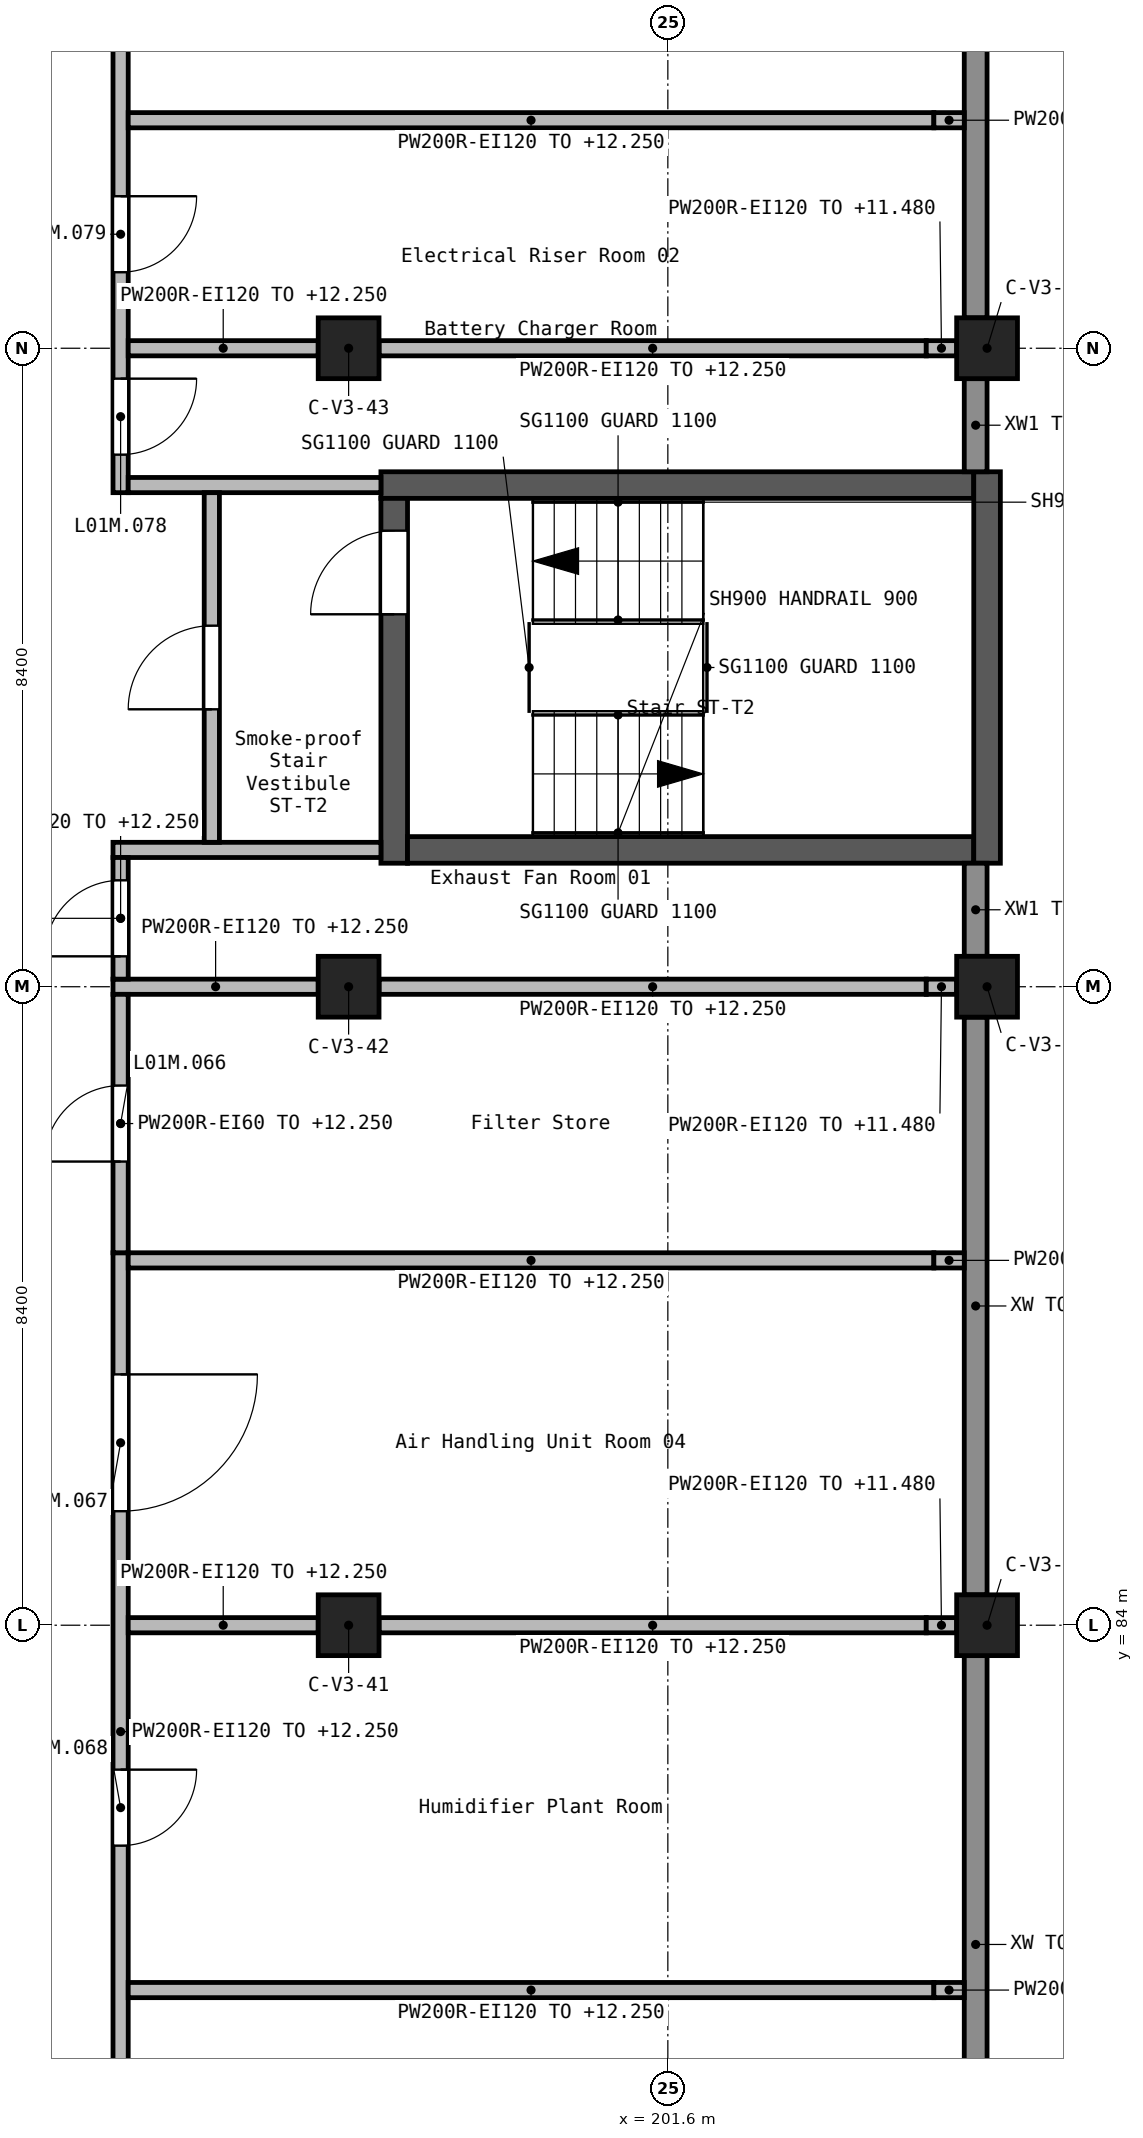
"""IFC4 building model, lengths in metres.
Left out: names, types, materials, properties, quantities, classifications, styles, units other than length and angle.
Written with IfcOpenShell. Run it as: python <this file> out.ifc"""

import sys

from ifc_helpers import new_model, si_unit, direction, frame, frame_2d, origin, origin_2d, place, context, subcontext, project, spatial, rectangle, extrude, element, fill, save


model = new_model("IFC4")
c1 = context("Model", 3, precision=1e-05, world=origin(), true_north=direction((0.0, 1.0)))
c2 = subcontext(c1, "Body", "Model", "MODEL_VIEW")
j1 = project(units=[si_unit("LENGTHUNIT", "METRE"), si_unit("PLANEANGLEUNIT", "RADIAN")], contexts=[c1])
p1 = place(None, origin())
s1 = spatial("IfcSite", under=j1, at=p1, CompositionType="ELEMENT")
p2 = place(p1, origin())
s2 = spatial("IfcBuilding", under=s1, at=p2, CompositionType="ELEMENT")
p3 = place(p2, frame((0.0, 0.0, 9.9)))
s3 = spatial("IfcBuildingStorey", under=s2, at=p3, CompositionType="ELEMENT", Elevation=9.9)
for number, where, z_axis, x_axis in (
    (1, (197.4, 84.0, 0.0), (0.0, 0.0, 1.0), (1.0, 0.0, 0.0)),
    (2, (197.4, 92.4, 0.0), (0.0, 0.0, 1.0), (1.0, 0.0, 0.0)),
    (3, (197.4, 100.8, 0.0), (0.0, 0.0, 1.0), (1.0, 0.0, 0.0)),
    (4, (205.8, 84.0, 0.0), (0.0, 0.0, 1.0), (1.0, 0.0, 0.0)),
    (5, (205.8, 92.4, 0.0), (0.0, 0.0, 1.0), (1.0, 0.0, 0.0)),
    (6, (205.8, 100.8, 0.0), (0.0, 0.0, 1.0), (1.0, 0.0, 0.0)),
):
    element("IfcColumn", number, at=place(p3, frame(where, z_axis=z_axis, x_axis=x_axis)), inside=s3, PredefinedType="COLUMN", context=c2, shape_type="SweptSolid", body=[
        extrude(rectangle(XDim=0.8, YDim=0.8, at=origin_2d()), origin(), (0.0, 0.0, 1.0), 2.7),
    ])
p4 = place(p3, frame((197.825, 99.0, 0.0), z_axis=(0.0, 0.0, 1.0), x_axis=(1.0, 0.0, 0.0)))
e7 = element("IfcWall", 7, at=p4, inside=s3, PredefinedType="SHEAR", context=c2, shape_type="SweptSolid", body=[
    extrude(rectangle(XDim=7.8, YDim=0.35, at=frame_2d((3.9, 0.0))), origin(), (0.0, 0.0, 1.0), 2.7),
])
p5 = place(p3, frame((198.0, 94.025, 0.0), z_axis=(0.0, 0.0, 1.0), x_axis=(0.0, 1.0, 0.0)))
e8 = element("IfcWall", 8, at=p5, inside=s3, PredefinedType="SHEAR", context=c2, shape_type="SweptSolid", body=[
    extrude(rectangle(XDim=4.8, YDim=0.35, at=frame_2d((2.4, 0.0))), origin(), (0.0, 0.0, 1.0), 2.7),
])
p6 = place(p5, frame((3.275, 0.0, 0.0)))
e9 = element("IfcOpeningElement", 9, at=p6, cuts=e8, PredefinedType="OPENING", context=c2, shape_type="SweptSolid", body=[
    extrude(rectangle(XDim=1.1, YDim=2.1, at=frame_2d((0.55, 1.05))), frame((0.0, 0.185, 0.0), z_axis=(0.0, -1.0, 0.0), x_axis=(1.0, 0.0, 0.0)), (0.0, 0.0, 1.0), 0.37),
])
p7 = place(p3, frame((198.175, 94.2, 0.0), z_axis=(0.0, 0.0, 1.0), x_axis=(1.0, 0.0, 0.0)))
e10 = element("IfcWall", 10, at=p7, inside=s3, PredefinedType="SHEAR", context=c2, shape_type="SweptSolid", body=[
    extrude(rectangle(XDim=7.45, YDim=0.35, at=frame_2d((3.725, 0.0))), origin(), (0.0, 0.0, 1.0), 2.7),
])
p8 = place(p3, frame((205.8, 94.025, 0.0), z_axis=(0.0, 0.0, 1.0), x_axis=(0.0, 1.0, 0.0)))
e11 = element("IfcWall", 11, at=p8, inside=s3, PredefinedType="SHEAR", context=c2, shape_type="SweptSolid", body=[
    extrude(rectangle(XDim=5.15, YDim=0.35, at=frame_2d((2.575, 0.0))), origin(), (0.0, 0.0, 1.0), 2.7),
])
for number, where, z_axis, x_axis in (
    (12, (205.65, 76.0, 0.0), (0.0, 0.0, 1.0), (0.0, 1.0, 0.0)),
    (13, (205.65, 84.4, 0.0), (0.0, 0.0, 1.0), (0.0, 1.0, 0.0)),
):
    element("IfcWall", number, at=place(p3, frame(where, z_axis=z_axis, x_axis=x_axis)), inside=s3, PredefinedType="STANDARD", context=c2, shape_type="SweptSolid", body=[
        extrude(rectangle(XDim=7.6, YDim=0.3, at=frame_2d((3.8, 0.0))), origin(), (0.0, 0.0, 1.0), 1.55),
    ])
for number, where, z_axis, x_axis in (
    (14, (205.65, 92.8, 0.0), (0.0, 0.0, 1.0), (0.0, 1.0, 0.0)),
    (15, (205.65, 99.175, 0.0), (0.0, 0.0, 1.0), (0.0, 1.0, 0.0)),
):
    element("IfcWall", number, at=place(p3, frame(where, z_axis=z_axis, x_axis=x_axis)), inside=s3, PredefinedType="STANDARD", context=c2, shape_type="SweptSolid", body=[
        extrude(rectangle(XDim=1.225, YDim=0.3, at=frame_2d((0.612, 0.0))), origin(), (0.0, 0.0, 1.0), 1.55),
    ])
p9 = place(p3, frame((205.65, 101.2, 0.0), z_axis=(0.0, 0.0, 1.0), x_axis=(0.0, 1.0, 0.0)))
e16 = element("IfcWall", 16, at=p9, inside=s3, PredefinedType="STANDARD", context=c2, shape_type="SweptSolid", body=[
    extrude(rectangle(XDim=7.6, YDim=0.3, at=frame_2d((3.8, 0.0))), origin(), (0.0, 0.0, 1.0), 1.55),
])
p10 = place(p3, frame((194.4, 116.9, 0.0), z_axis=(0.0, 0.0, 1.0), x_axis=(0.0, -1.0, 0.0)))
e17 = element("IfcWall", 17, at=p10, inside=s3, PredefinedType="SOLIDWALL", context=c2, shape_type="SweptSolid", body=[
    extrude(rectangle(XDim=18.0, YDim=0.2, at=frame_2d((9.0, 0.0))), origin(), (0.0, 0.0, 1.0), 2.35),
])
p11 = place(p10, frame((16.5, 0.0, 0.0)))
e18 = element("IfcOpeningElement", 18, at=p11, cuts=e17, PredefinedType="OPENING", context=c2, shape_type="SweptSolid", body=[
    extrude(rectangle(XDim=1.0, YDim=2.1, at=frame_2d((0.5, 1.05))), frame((0.0, 0.11, 0.0), z_axis=(0.0, -1.0, 0.0), x_axis=(1.0, 0.0, 0.0)), (0.0, 0.0, 1.0), 0.22),
])
p12 = place(p10, frame((14.1, 0.0, 0.0)))
e19 = element("IfcOpeningElement", 19, at=p12, cuts=e17, PredefinedType="OPENING", context=c2, shape_type="SweptSolid", body=[
    extrude(rectangle(XDim=1.0, YDim=2.1, at=frame_2d((0.5, 1.05))), frame((0.0, 0.11, 0.0), z_axis=(0.0, -1.0, 0.0), x_axis=(1.0, 0.0, 0.0)), (0.0, 0.0, 1.0), 0.22),
])
p13 = place(p10, frame((9.9, 0.0, 0.0)))
e20 = element("IfcOpeningElement", 20, at=p13, cuts=e17, PredefinedType="OPENING", context=c2, shape_type="SweptSolid", body=[
    extrude(rectangle(XDim=1.0, YDim=2.1, at=frame_2d((0.5, 1.05))), frame((0.0, 0.11, 0.0), z_axis=(0.0, -1.0, 0.0), x_axis=(1.0, 0.0, 0.0)), (0.0, 0.0, 1.0), 0.22),
])
p14 = place(p10, frame((2.6, 0.0, 0.0)))
e21 = element("IfcOpeningElement", 21, at=p14, cuts=e17, PredefinedType="OPENING", context=c2, shape_type="SweptSolid", body=[
    extrude(rectangle(XDim=1.8, YDim=2.1, at=frame_2d((0.9, 1.05))), frame((0.0, 0.11, 0.0), z_axis=(0.0, -1.0, 0.0), x_axis=(1.0, 0.0, 0.0)), (0.0, 0.0, 1.0), 0.22),
])
p15 = place(p3, frame((194.4, 88.9, 0.0), z_axis=(0.0, 0.0, 1.0), x_axis=(0.0, -1.0, 0.0)))
e22 = element("IfcWall", 22, at=p15, inside=s3, PredefinedType="SOLIDWALL", context=c2, shape_type="SweptSolid", body=[
    extrude(rectangle(XDim=12.6, YDim=0.2, at=frame_2d((6.3, 0.0))), origin(), (0.0, 0.0, 1.0), 2.35),
])
p16 = place(p15, frame((1.6, 0.0, 0.0)))
e23 = element("IfcOpeningElement", 23, at=p16, cuts=e22, PredefinedType="OPENING", context=c2, shape_type="SweptSolid", body=[
    extrude(rectangle(XDim=1.8, YDim=2.1, at=frame_2d((0.9, 1.05))), frame((0.0, 0.11, 0.0), z_axis=(0.0, -1.0, 0.0), x_axis=(1.0, 0.0, 0.0)), (0.0, 0.0, 1.0), 0.22),
])
p17 = place(p15, frame((6.8, 0.0, 0.0)))
e24 = element("IfcOpeningElement", 24, at=p17, cuts=e22, PredefinedType="OPENING", context=c2, shape_type="SweptSolid", body=[
    extrude(rectangle(XDim=1.0, YDim=2.1, at=frame_2d((0.5, 1.05))), frame((0.0, 0.11, 0.0), z_axis=(0.0, -1.0, 0.0), x_axis=(1.0, 0.0, 0.0)), (0.0, 0.0, 1.0), 0.22),
])
p18 = place(p15, frame((11.0, 0.0, 0.0)))
e25 = element("IfcOpeningElement", 25, at=p18, cuts=e22, PredefinedType="OPENING", context=c2, shape_type="SweptSolid", body=[
    extrude(rectangle(XDim=1.0, YDim=2.1, at=frame_2d((0.5, 1.05))), frame((0.0, 0.11, 0.0), z_axis=(0.0, -1.0, 0.0), x_axis=(1.0, 0.0, 0.0)), (0.0, 0.0, 1.0), 0.22),
])
p19 = place(p3, frame((194.5, 79.2, 0.0), z_axis=(0.0, 0.0, 1.0), x_axis=(1.0, 0.0, 0.0)))
e26 = element("IfcWall", 26, at=p19, inside=s3, PredefinedType="SOLIDWALL", context=c2, shape_type="SweptSolid", body=[
    extrude(rectangle(XDim=10.6, YDim=0.2, at=frame_2d((5.3, 0.0))), origin(), (0.0, 0.0, 1.0), 2.35),
])
p20 = place(p3, frame((205.1, 79.2, 0.0), z_axis=(0.0, 0.0, 1.0), x_axis=(1.0, 0.0, 0.0)))
e27 = element("IfcWall", 27, at=p20, inside=s3, PredefinedType="SOLIDWALL", context=c2, shape_type="SweptSolid", body=[
    extrude(rectangle(XDim=0.4, YDim=0.2, at=frame_2d((0.2, 0.0))), origin(), (0.0, 0.0, 1.0), 1.58),
])
p21 = place(p3, frame((194.5, 84.0, 0.0), z_axis=(0.0, 0.0, 1.0), x_axis=(1.0, 0.0, 0.0)))
e28 = element("IfcWall", 28, at=p21, inside=s3, PredefinedType="SOLIDWALL", context=c2, shape_type="SweptSolid", body=[
    extrude(rectangle(XDim=2.5, YDim=0.2, at=frame_2d((1.25, 0.0))), origin(), (0.0, 0.0, 1.0), 2.35),
])
p22 = place(p3, frame((197.8, 84.0, 0.0), z_axis=(0.0, 0.0, 1.0), x_axis=(1.0, 0.0, 0.0)))
e29 = element("IfcWall", 29, at=p22, inside=s3, PredefinedType="SOLIDWALL", context=c2, shape_type="SweptSolid", body=[
    extrude(rectangle(XDim=7.2, YDim=0.2, at=frame_2d((3.6, 0.0))), origin(), (0.0, 0.0, 1.0), 2.35),
])
p23 = place(p3, frame((205.0, 84.0, 0.0), z_axis=(0.0, 0.0, 1.0), x_axis=(1.0, 0.0, 0.0)))
e30 = element("IfcWall", 30, at=p23, inside=s3, PredefinedType="SOLIDWALL", context=c2, shape_type="SweptSolid", body=[
    extrude(rectangle(XDim=0.4, YDim=0.2, at=frame_2d((0.2, 0.0))), origin(), (0.0, 0.0, 1.0), 1.58),
])
p24 = place(p3, frame((194.5, 88.8, 0.0), z_axis=(0.0, 0.0, 1.0), x_axis=(1.0, 0.0, 0.0)))
e31 = element("IfcWall", 31, at=p24, inside=s3, PredefinedType="SOLIDWALL", context=c2, shape_type="SweptSolid", body=[
    extrude(rectangle(XDim=10.6, YDim=0.2, at=frame_2d((5.3, 0.0))), origin(), (0.0, 0.0, 1.0), 2.35),
])
p25 = place(p3, frame((205.1, 88.8, 0.0), z_axis=(0.0, 0.0, 1.0), x_axis=(1.0, 0.0, 0.0)))
e32 = element("IfcWall", 32, at=p25, inside=s3, PredefinedType="SOLIDWALL", context=c2, shape_type="SweptSolid", body=[
    extrude(rectangle(XDim=0.4, YDim=0.2, at=frame_2d((0.2, 0.0))), origin(), (0.0, 0.0, 1.0), 1.58),
])
p26 = place(p3, frame((194.3, 92.4, 0.0), z_axis=(0.0, 0.0, 1.0), x_axis=(1.0, 0.0, 0.0)))
e33 = element("IfcWall", 33, at=p26, inside=s3, PredefinedType="SOLIDWALL", context=c2, shape_type="SweptSolid", body=[
    extrude(rectangle(XDim=2.7, YDim=0.2, at=frame_2d((1.35, 0.0))), origin(), (0.0, 0.0, 1.0), 2.35),
])
p27 = place(p3, frame((197.8, 92.4, 0.0), z_axis=(0.0, 0.0, 1.0), x_axis=(1.0, 0.0, 0.0)))
e34 = element("IfcWall", 34, at=p27, inside=s3, PredefinedType="SOLIDWALL", context=c2, shape_type="SweptSolid", body=[
    extrude(rectangle(XDim=7.2, YDim=0.2, at=frame_2d((3.6, 0.0))), origin(), (0.0, 0.0, 1.0), 2.35),
])
p28 = place(p3, frame((205.0, 92.4, 0.0), z_axis=(0.0, 0.0, 1.0), x_axis=(1.0, 0.0, 0.0)))
e35 = element("IfcWall", 35, at=p28, inside=s3, PredefinedType="SOLIDWALL", context=c2, shape_type="SweptSolid", body=[
    extrude(rectangle(XDim=0.4, YDim=0.2, at=frame_2d((0.2, 0.0))), origin(), (0.0, 0.0, 1.0), 1.58),
])
p29 = place(p3, frame((194.5, 100.8, 0.0), z_axis=(0.0, 0.0, 1.0), x_axis=(1.0, 0.0, 0.0)))
e36 = element("IfcWall", 36, at=p29, inside=s3, PredefinedType="SOLIDWALL", context=c2, shape_type="SweptSolid", body=[
    extrude(rectangle(XDim=2.5, YDim=0.2, at=frame_2d((1.25, 0.0))), origin(), (0.0, 0.0, 1.0), 2.35),
])
p30 = place(p3, frame((197.8, 100.8, 0.0), z_axis=(0.0, 0.0, 1.0), x_axis=(1.0, 0.0, 0.0)))
e37 = element("IfcWall", 37, at=p30, inside=s3, PredefinedType="SOLIDWALL", context=c2, shape_type="SweptSolid", body=[
    extrude(rectangle(XDim=7.2, YDim=0.2, at=frame_2d((3.6, 0.0))), origin(), (0.0, 0.0, 1.0), 2.35),
])
p31 = place(p3, frame((205.0, 100.8, 0.0), z_axis=(0.0, 0.0, 1.0), x_axis=(1.0, 0.0, 0.0)))
e38 = element("IfcWall", 38, at=p31, inside=s3, PredefinedType="SOLIDWALL", context=c2, shape_type="SweptSolid", body=[
    extrude(rectangle(XDim=0.4, YDim=0.2, at=frame_2d((0.2, 0.0))), origin(), (0.0, 0.0, 1.0), 1.58),
])
p32 = place(p3, frame((194.5, 103.8, 0.0), z_axis=(0.0, 0.0, 1.0), x_axis=(1.0, 0.0, 0.0)))
e39 = element("IfcWall", 39, at=p32, inside=s3, PredefinedType="SOLIDWALL", context=c2, shape_type="SweptSolid", body=[
    extrude(rectangle(XDim=10.6, YDim=0.2, at=frame_2d((5.3, 0.0))), origin(), (0.0, 0.0, 1.0), 2.35),
])
p33 = place(p3, frame((205.1, 103.8, 0.0), z_axis=(0.0, 0.0, 1.0), x_axis=(1.0, 0.0, 0.0)))
e40 = element("IfcWall", 40, at=p33, inside=s3, PredefinedType="SOLIDWALL", context=c2, shape_type="SweptSolid", body=[
    extrude(rectangle(XDim=0.4, YDim=0.2, at=frame_2d((0.2, 0.0))), origin(), (0.0, 0.0, 1.0), 1.58),
])
p34 = place(p3, frame((197.825, 94.2, 0.0), z_axis=(0.0, 0.0, 1.0), x_axis=(-1.0, 0.0, 0.0)))
e41 = element("IfcWall", 41, at=p34, inside=s3, PredefinedType="SOLIDWALL", context=c2, shape_type="SweptSolid", body=[
    extrude(rectangle(XDim=3.525, YDim=0.2, at=frame_2d((1.762, 0.0))), origin(), (0.0, 0.0, 1.0), 2.35),
])
p35 = place(p3, frame((197.825, 99.0, 0.0), z_axis=(0.0, 0.0, 1.0), x_axis=(-1.0, 0.0, 0.0)))
e42 = element("IfcWall", 42, at=p35, inside=s3, PredefinedType="SOLIDWALL", context=c2, shape_type="SweptSolid", body=[
    extrude(rectangle(XDim=3.325, YDim=0.2, at=frame_2d((1.663, 0.0))), origin(), (0.0, 0.0, 1.0), 2.35),
])
p36 = place(p3, frame((195.6, 94.3, 0.0), z_axis=(0.0, 0.0, 1.0), x_axis=(0.0, 1.0, 0.0)))
e43 = element("IfcWall", 43, at=p36, inside=s3, PredefinedType="SOLIDWALL", context=c2, shape_type="SweptSolid", body=[
    extrude(rectangle(XDim=4.6, YDim=0.2, at=frame_2d((2.3, 0.0))), origin(), (0.0, 0.0, 1.0), 2.35),
])
p37 = place(p36, frame((1.75, 0.0, 0.0)))
e44 = element("IfcOpeningElement", 44, at=p37, cuts=e43, PredefinedType="OPENING", context=c2, shape_type="SweptSolid", body=[
    extrude(rectangle(XDim=1.1, YDim=2.1, at=frame_2d((0.55, 1.05))), frame((0.0, 0.11, 0.0), z_axis=(0.0, -1.0, 0.0), x_axis=(1.0, 0.0, 0.0)), (0.0, 0.0, 1.0), 0.22),
])
p38 = place(p3, frame((194.4, 88.9, 0.0), z_axis=(0.0, 0.0, 1.0), x_axis=(0.0, 1.0, 0.0)))
e45 = element("IfcWall", 45, at=p38, inside=s3, PredefinedType="SOLIDWALL", context=c2, shape_type="SweptSolid", body=[
    extrude(rectangle(XDim=3.4, YDim=0.2, at=frame_2d((1.7, 0.0))), origin(), (0.0, 0.0, 1.0), 2.35),
])
p39 = place(p38, frame((1.2, 0.0, 0.0)))
e46 = element("IfcOpeningElement", 46, at=p39, cuts=e45, PredefinedType="OPENING", context=c2, shape_type="SweptSolid", body=[
    extrude(rectangle(XDim=1.0, YDim=2.1, at=frame_2d((0.5, 1.05))), frame((0.0, 0.11, 0.0), z_axis=(0.0, -1.0, 0.0), x_axis=(1.0, 0.0, 0.0)), (0.0, 0.0, 1.0), 0.22),
])
p40 = place(p3, frame((194.4, 92.5, 0.0), z_axis=(0.0, 0.0, 1.0), x_axis=(0.0, 1.0, 0.0)))
e47 = element("IfcWall", 47, at=p40, inside=s3, PredefinedType="SOLIDWALL", context=c2, shape_type="SweptSolid", body=[
    extrude(rectangle(XDim=1.6, YDim=0.2, at=frame_2d((0.8, 0.0))), origin(), (0.0, 0.0, 1.0), 2.35),
])
p41 = place(p40, frame((0.3, 0.0, 0.0)))
e48 = element("IfcOpeningElement", 48, at=p41, cuts=e47, PredefinedType="OPENING", context=c2, shape_type="SweptSolid", body=[
    extrude(rectangle(XDim=1.0, YDim=2.1, at=frame_2d((0.5, 1.05))), frame((0.0, 0.11, 0.0), z_axis=(0.0, -1.0, 0.0), x_axis=(1.0, 0.0, 0.0)), (0.0, 0.0, 1.0), 0.22),
])
p42 = place(p6, frame((1.1, 0.0, 0.0), z_axis=(0.0, 0.0, 1.0), x_axis=(-1.0, 0.0, 0.0)))
e49 = element("IfcDoor", 49, at=p42, inside=s3, OperationType="SINGLE_SWING_LEFT", PredefinedType="DOOR", context=c2, shape_type="SweptSolid", body=[
    extrude(rectangle(XDim=1.1, YDim=2.1, at=frame_2d((0.55, 1.05))), frame((0.0, 0.025, 0.0), z_axis=(0.0, -1.0, 0.0), x_axis=(1.0, 0.0, 0.0)), (0.0, 0.0, 1.0), 0.05),
])
fill(e9, e49)
p43 = place(p37, frame((1.1, 0.0, 0.0), z_axis=(0.0, 0.0, 1.0), x_axis=(-1.0, 0.0, 0.0)))
e50 = element("IfcDoor", 50, at=p43, inside=s3, OperationType="SINGLE_SWING_RIGHT", PredefinedType="DOOR", context=c2, shape_type="SweptSolid", body=[
    extrude(rectangle(XDim=1.1, YDim=2.1, at=frame_2d((0.55, 1.05))), frame((0.0, 0.025, 0.0), z_axis=(0.0, -1.0, 0.0), x_axis=(1.0, 0.0, 0.0)), (0.0, 0.0, 1.0), 0.05),
])
fill(e44, e50)
p44 = place(p41, frame((1.0, 0.0, 0.0), z_axis=(0.0, 0.0, 1.0), x_axis=(-1.0, 0.0, 0.0)))
e51 = element("IfcDoor", 51, at=p44, inside=s3, OperationType="SINGLE_SWING_RIGHT", PredefinedType="DOOR", context=c2, shape_type="SweptSolid", body=[
    extrude(rectangle(XDim=1.0, YDim=2.1, at=frame_2d((0.5, 1.05))), frame((0.0, 0.025, 0.0), z_axis=(0.0, -1.0, 0.0), x_axis=(1.0, 0.0, 0.0)), (0.0, 0.0, 1.0), 0.05),
])
fill(e48, e51)
p45 = place(p39, frame((1.0, 0.0, 0.0), z_axis=(0.0, 0.0, 1.0), x_axis=(-1.0, 0.0, 0.0)))
e52 = element("IfcDoor", 52, at=p45, inside=s3, OperationType="SINGLE_SWING_RIGHT", PredefinedType="DOOR", context=c2, shape_type="SweptSolid", body=[
    extrude(rectangle(XDim=1.0, YDim=2.1, at=frame_2d((0.5, 1.05))), frame((0.0, 0.025, 0.0), z_axis=(0.0, -1.0, 0.0), x_axis=(1.0, 0.0, 0.0)), (0.0, 0.0, 1.0), 0.05),
])
fill(e46, e52)
p46 = place(p16, origin())
e53 = element("IfcDoor", 53, at=p46, inside=s3, OperationType="DOUBLE_DOOR_SINGLE_SWING", PredefinedType="DOOR", context=c2, shape_type="SweptSolid", body=[
    extrude(rectangle(XDim=1.8, YDim=2.1, at=frame_2d((0.9, 1.05))), frame((0.0, 0.025, 0.0), z_axis=(0.0, -1.0, 0.0), x_axis=(1.0, 0.0, 0.0)), (0.0, 0.0, 1.0), 0.05),
])
fill(e23, e53)
p47 = place(p17, origin())
e54 = element("IfcDoor", 54, at=p47, inside=s3, OperationType="SINGLE_SWING_RIGHT", PredefinedType="DOOR", context=c2, shape_type="SweptSolid", body=[
    extrude(rectangle(XDim=1.0, YDim=2.1, at=frame_2d((0.5, 1.05))), frame((0.0, 0.025, 0.0), z_axis=(0.0, -1.0, 0.0), x_axis=(1.0, 0.0, 0.0)), (0.0, 0.0, 1.0), 0.05),
])
fill(e24, e54)
p48 = place(p11, origin())
e55 = element("IfcDoor", 55, at=p48, inside=s3, OperationType="SINGLE_SWING_RIGHT", PredefinedType="DOOR", context=c2, shape_type="SweptSolid", body=[
    extrude(rectangle(XDim=1.0, YDim=2.1, at=frame_2d((0.5, 1.05))), frame((0.0, 0.025, 0.0), z_axis=(0.0, -1.0, 0.0), x_axis=(1.0, 0.0, 0.0)), (0.0, 0.0, 1.0), 0.05),
])
fill(e18, e55)
p49 = place(p12, origin())
e56 = element("IfcDoor", 56, at=p49, inside=s3, OperationType="SINGLE_SWING_RIGHT", PredefinedType="DOOR", context=c2, shape_type="SweptSolid", body=[
    extrude(rectangle(XDim=1.0, YDim=2.1, at=frame_2d((0.5, 1.05))), frame((0.0, 0.025, 0.0), z_axis=(0.0, -1.0, 0.0), x_axis=(1.0, 0.0, 0.0)), (0.0, 0.0, 1.0), 0.05),
])
fill(e19, e56)
save(model, sys.argv[1])
